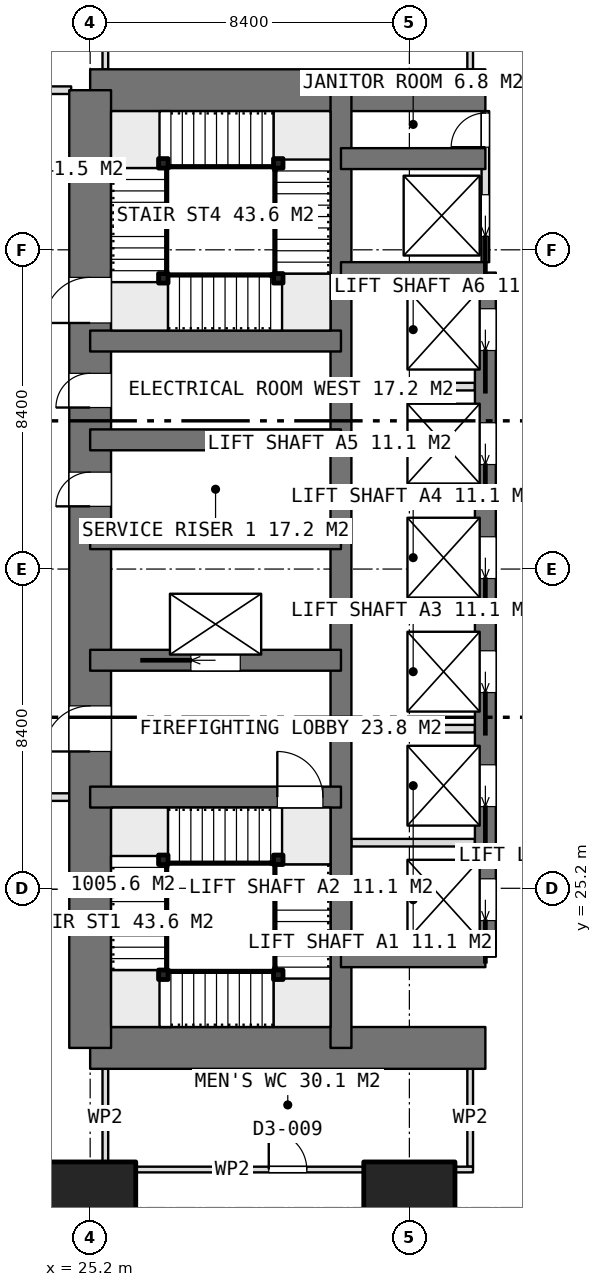
"""IFC4 building model, lengths in metres.
Left out: names, types, materials, properties, quantities, classifications, styles, units other than length and angle.
Written with IfcOpenShell. Run it as: python <this file> out.ifc"""

import sys

from ifc_helpers import new_model, si_unit, direction, frame, frame_2d, origin, origin_2d, place, context, subcontext, project, spatial, rectangle, extrude, element, fill, save


model = new_model("IFC4")
c1 = context("Model", 3, precision=1e-05, world=origin(), true_north=direction((0.0, 1.0)))
c2 = subcontext(c1, "Body", "Model", "MODEL_VIEW")
j1 = project(units=[si_unit("LENGTHUNIT", "METRE"), si_unit("PLANEANGLEUNIT", "RADIAN")], contexts=[c1])
p1 = place(None, origin())
s1 = spatial("IfcSite", under=j1, at=p1, CompositionType="ELEMENT")
p2 = place(p1, origin())
s2 = spatial("IfcBuilding", under=s1, at=p2, CompositionType="ELEMENT")
p3 = place(p2, origin())
s3 = spatial("IfcBuildingStorey", under=s2, at=p3, CompositionType="ELEMENT", Elevation=0.0)
for number, where, z_axis, x_axis in (
    (1, (25.2, 21.0, 0.0), (0.0, 0.0, 1.0), (1.0, 0.0, 0.0)),
    (2, (25.2, 46.2, 0.0), (0.0, 0.0, 1.0), (1.0, 0.0, 0.0)),
):
    element("IfcWall", number, at=place(p3, frame(where, z_axis=z_axis, x_axis=x_axis)), inside=s3, PredefinedType="SHEAR", context=c2, shape_type="SweptSolid", body=[
        extrude(rectangle(XDim=10.4, YDim=1.1, at=frame_2d((5.2, 0.0))), origin(), (0.0, 0.0, 1.0), 5.4),
    ])
p4 = place(p3, frame((25.2, 21.0, 0.0), z_axis=(0.0, 0.0, 1.0), x_axis=(0.0, 1.0, 0.0)))
e3 = element("IfcWall", 3, at=p4, inside=s3, PredefinedType="SHEAR", context=c2, shape_type="SweptSolid", body=[
    extrude(rectangle(XDim=25.2, YDim=1.1, at=frame_2d((12.6, 0.0))), origin(), (0.0, 0.0, 1.0), 5.4),
])
p5 = place(p4, frame((7.8, 0.0, 0.0)))
e4 = element("IfcOpeningElement", 4, at=p5, cuts=e3, PredefinedType="OPENING", context=c2, shape_type="SweptSolid", body=[
    extrude(rectangle(XDim=1.2, YDim=2.1, at=frame_2d((0.6, 1.05))), frame((0.0, 0.56, 0.0), z_axis=(0.0, -1.0, 0.0), x_axis=(1.0, 0.0, 0.0)), (0.0, 0.0, 1.0), 1.12),
])
p6 = place(p4, frame((14.25, 0.0, 0.0)))
e5 = element("IfcOpeningElement", 5, at=p6, cuts=e3, PredefinedType="OPENING", context=c2, shape_type="SweptSolid", body=[
    extrude(rectangle(XDim=0.9, YDim=2.1, at=frame_2d((0.45, 1.05))), frame((0.0, 0.56, 0.0), z_axis=(0.0, -1.0, 0.0), x_axis=(1.0, 0.0, 0.0)), (0.0, 0.0, 1.0), 1.12),
])
p7 = place(p4, frame((16.85, 0.0, 0.0)))
e6 = element("IfcOpeningElement", 6, at=p7, cuts=e3, PredefinedType="OPENING", context=c2, shape_type="SweptSolid", body=[
    extrude(rectangle(XDim=0.9, YDim=2.1, at=frame_2d((0.45, 1.05))), frame((0.0, 0.56, 0.0), z_axis=(0.0, -1.0, 0.0), x_axis=(1.0, 0.0, 0.0)), (0.0, 0.0, 1.0), 1.12),
])
p8 = place(p4, frame((19.075, 0.0, 0.0)))
e7 = element("IfcOpeningElement", 7, at=p8, cuts=e3, PredefinedType="OPENING", context=c2, shape_type="SweptSolid", body=[
    extrude(rectangle(XDim=1.2, YDim=2.1, at=frame_2d((0.6, 1.05))), frame((0.0, 0.56, 0.0), z_axis=(0.0, -1.0, 0.0), x_axis=(1.0, 0.0, 0.0)), (0.0, 0.0, 1.0), 1.12),
])
p9 = place(p3, frame((31.8, 21.0, 0.0), z_axis=(0.0, 0.0, 1.0), x_axis=(0.0, 1.0, 0.0)))
e8 = element("IfcWall", 8, at=p9, inside=s3, PredefinedType="SHEAR", context=c2, shape_type="SweptSolid", body=[
    extrude(rectangle(XDim=25.2, YDim=0.55, at=frame_2d((12.6, 0.0))), origin(), (0.0, 0.0, 1.0), 5.4),
])
p10 = place(p3, frame((35.6, 23.4, 0.0), z_axis=(0.0, 0.0, 1.0), x_axis=(0.0, 1.0, 0.0)))
e9 = element("IfcWall", 9, at=p10, inside=s3, PredefinedType="SHEAR", context=c2, shape_type="SweptSolid", body=[
    extrude(rectangle(XDim=18.0, YDim=0.55, at=frame_2d((9.0, 0.0))), origin(), (0.0, 0.0, 1.0), 5.4),
])
p11 = place(p10, frame((0.95, 0.0, 0.0)))
e10 = element("IfcOpeningElement", 10, at=p11, cuts=e9, PredefinedType="OPENING", context=c2, shape_type="SweptSolid", body=[
    extrude(rectangle(XDim=1.1, YDim=2.1, at=frame_2d((0.55, 1.05))), frame((0.0, 0.285, 0.0), z_axis=(0.0, -1.0, 0.0), x_axis=(1.0, 0.0, 0.0)), (0.0, 0.0, 1.0), 0.57),
])
p12 = place(p10, frame((3.95, 0.0, 0.0)))
e11 = element("IfcOpeningElement", 11, at=p12, cuts=e9, PredefinedType="OPENING", context=c2, shape_type="SweptSolid", body=[
    extrude(rectangle(XDim=1.1, YDim=2.1, at=frame_2d((0.55, 1.05))), frame((0.0, 0.285, 0.0), z_axis=(0.0, -1.0, 0.0), x_axis=(1.0, 0.0, 0.0)), (0.0, 0.0, 1.0), 0.57),
])
p13 = place(p10, frame((6.95, 0.0, 0.0)))
e12 = element("IfcOpeningElement", 12, at=p13, cuts=e9, PredefinedType="OPENING", context=c2, shape_type="SweptSolid", body=[
    extrude(rectangle(XDim=1.1, YDim=2.1, at=frame_2d((0.55, 1.05))), frame((0.0, 0.285, 0.0), z_axis=(0.0, -1.0, 0.0), x_axis=(1.0, 0.0, 0.0)), (0.0, 0.0, 1.0), 0.57),
])
p14 = place(p10, frame((9.95, 0.0, 0.0)))
e13 = element("IfcOpeningElement", 13, at=p14, cuts=e9, PredefinedType="OPENING", context=c2, shape_type="SweptSolid", body=[
    extrude(rectangle(XDim=1.1, YDim=2.1, at=frame_2d((0.55, 1.05))), frame((0.0, 0.285, 0.0), z_axis=(0.0, -1.0, 0.0), x_axis=(1.0, 0.0, 0.0)), (0.0, 0.0, 1.0), 0.57),
])
p15 = place(p10, frame((12.95, 0.0, 0.0)))
e14 = element("IfcOpeningElement", 14, at=p15, cuts=e9, PredefinedType="OPENING", context=c2, shape_type="SweptSolid", body=[
    extrude(rectangle(XDim=1.1, YDim=2.1, at=frame_2d((0.55, 1.05))), frame((0.0, 0.285, 0.0), z_axis=(0.0, -1.0, 0.0), x_axis=(1.0, 0.0, 0.0)), (0.0, 0.0, 1.0), 0.57),
])
p16 = place(p10, frame((15.95, 0.0, 0.0)))
e15 = element("IfcOpeningElement", 15, at=p16, cuts=e9, PredefinedType="OPENING", context=c2, shape_type="SweptSolid", body=[
    extrude(rectangle(XDim=1.1, YDim=2.1, at=frame_2d((0.55, 1.05))), frame((0.0, 0.285, 0.0), z_axis=(0.0, -1.0, 0.0), x_axis=(1.0, 0.0, 0.0)), (0.0, 0.0, 1.0), 0.57),
])
for number, where, z_axis, x_axis in (
    (16, (31.8, 23.4, 0.0), (0.0, 0.0, 1.0), (1.0, 0.0, 0.0)),
    (17, (31.8, 41.4, 0.0), (0.0, 0.0, 1.0), (1.0, 0.0, 0.0)),
    (18, (31.8, 44.4, 0.0), (0.0, 0.0, 1.0), (1.0, 0.0, 0.0)),
):
    element("IfcWall", number, at=place(p3, frame(where, z_axis=z_axis, x_axis=x_axis)), inside=s3, PredefinedType="SHEAR", context=c2, shape_type="SweptSolid", body=[
        extrude(rectangle(XDim=3.8, YDim=0.55, at=frame_2d((1.9, 0.0))), origin(), (0.0, 0.0, 1.0), 5.4),
    ])
p17 = place(p3, frame((25.2, 27.6, 0.0), z_axis=(0.0, 0.0, 1.0), x_axis=(1.0, 0.0, 0.0)))
e19 = element("IfcWall", 19, at=p17, inside=s3, PredefinedType="SHEAR", context=c2, shape_type="SweptSolid", body=[
    extrude(rectangle(XDim=6.6, YDim=0.55, at=frame_2d((3.3, 0.0))), origin(), (0.0, 0.0, 1.0), 5.4),
])
p18 = place(p17, frame((4.925, 0.0, 0.0)))
e20 = element("IfcOpeningElement", 20, at=p18, cuts=e19, PredefinedType="OPENING", context=c2, shape_type="SweptSolid", body=[
    extrude(rectangle(XDim=1.2, YDim=2.1, at=frame_2d((0.6, 1.05))), frame((0.0, 0.285, 0.0), z_axis=(0.0, -1.0, 0.0), x_axis=(1.0, 0.0, 0.0)), (0.0, 0.0, 1.0), 0.57),
])
p19 = place(p3, frame((25.2, 31.2, 0.0), z_axis=(0.0, 0.0, 1.0), x_axis=(1.0, 0.0, 0.0)))
e21 = element("IfcWall", 21, at=p19, inside=s3, PredefinedType="SHEAR", context=c2, shape_type="SweptSolid", body=[
    extrude(rectangle(XDim=6.6, YDim=0.55, at=frame_2d((3.3, 0.0))), origin(), (0.0, 0.0, 1.0), 5.4),
])
p20 = place(p19, frame((2.65, 0.0, 0.0)))
e22 = element("IfcOpeningElement", 22, at=p20, cuts=e21, PredefinedType="OPENING", context=c2, shape_type="SweptSolid", body=[
    extrude(rectangle(XDim=1.3, YDim=2.1, at=frame_2d((0.65, 1.05))), frame((0.0, 0.285, 0.0), z_axis=(0.0, -1.0, 0.0), x_axis=(1.0, 0.0, 0.0)), (0.0, 0.0, 1.0), 0.57),
])
for number, where, z_axis, x_axis in (
    (23, (25.2, 34.4, 0.0), (0.0, 0.0, 1.0), (1.0, 0.0, 0.0)),
    (24, (25.2, 37.0, 0.0), (0.0, 0.0, 1.0), (1.0, 0.0, 0.0)),
    (25, (25.2, 39.6, 0.0), (0.0, 0.0, 1.0), (1.0, 0.0, 0.0)),
):
    element("IfcWall", number, at=place(p3, frame(where, z_axis=z_axis, x_axis=x_axis)), inside=s3, PredefinedType="SHEAR", context=c2, shape_type="SweptSolid", body=[
        extrude(rectangle(XDim=6.6, YDim=0.55, at=frame_2d((3.3, 0.0))), origin(), (0.0, 0.0, 1.0), 5.4),
    ])
for number, where, z_axis, x_axis in (
    (26, (25.2, 16.8, 0.0), (0.0, 0.0, 1.0), (1.0, 0.0, 0.0)),
    (27, (33.6, 16.8, 0.0), (0.0, 0.0, 1.0), (1.0, 0.0, 0.0)),
):
    element("IfcColumn", number, at=place(p3, frame(where, z_axis=z_axis, x_axis=x_axis)), inside=s3, PredefinedType="COLUMN", context=c2, shape_type="SweptSolid", body=[
        extrude(rectangle(XDim=2.4, YDim=2.4, at=origin_2d()), origin(), (0.0, 0.0, 1.0), 5.4),
    ])
for number, where, z_axis, x_axis in (
    (28, (32.075, 26.4, 0.0), (0.0, 0.0, 1.0), (1.0, 0.0, 0.0)),
    (29, (32.075, 29.4, 0.0), (0.0, 0.0, 1.0), (1.0, 0.0, 0.0)),
    (30, (32.075, 32.4, 0.0), (0.0, 0.0, 1.0), (1.0, 0.0, 0.0)),
    (31, (32.075, 35.4, 0.0), (0.0, 0.0, 1.0), (1.0, 0.0, 0.0)),
    (32, (32.075, 38.4, 0.0), (0.0, 0.0, 1.0), (1.0, 0.0, 0.0)),
):
    element("IfcWall", number, at=place(p3, frame(where, z_axis=z_axis, x_axis=x_axis)), inside=s3, PredefinedType="PARTITIONING", context=c2, shape_type="SweptSolid", body=[
        extrude(rectangle(XDim=3.25, YDim=0.2, at=frame_2d((1.625, 0.0))), origin(), (0.0, 0.0, 1.0), 5.1),
    ])
p21 = place(p3, frame((35.6, 41.675, 0.0), z_axis=(0.0, 0.0, 1.0), x_axis=(0.0, 1.0, 0.0)))
e33 = element("IfcWall", 33, at=p21, inside=s3, PredefinedType="PARTITIONING", context=c2, shape_type="SweptSolid", body=[
    extrude(rectangle(XDim=3.975, YDim=0.2, at=frame_2d((1.987, 0.0))), origin(), (0.0, 0.0, 1.0), 5.1),
])
p22 = place(p21, frame((3.025, 0.0, 0.0)))
e34 = element("IfcOpeningElement", 34, at=p22, cuts=e33, PredefinedType="OPENING", context=c2, shape_type="SweptSolid", body=[
    extrude(rectangle(XDim=0.9, YDim=2.1, at=frame_2d((0.45, 1.05))), frame((0.0, 0.11, 0.0), z_axis=(0.0, -1.0, 0.0), x_axis=(1.0, 0.0, 0.0)), (0.0, 0.0, 1.0), 0.22),
])
p23 = place(p21, frame((0.675, 0.0, 0.0)))
e35 = element("IfcOpeningElement", 35, at=p23, cuts=e33, PredefinedType="OPENING", context=c2, shape_type="SweptSolid", body=[
    extrude(rectangle(XDim=1.1, YDim=2.1, at=frame_2d((0.55, 1.05))), frame((0.0, 0.11, 0.0), z_axis=(0.0, -1.0, 0.0), x_axis=(1.0, 0.0, 0.0)), (0.0, 0.0, 1.0), 0.22),
])
for number, where, z_axis, x_axis in (
    (36, (25.6, 46.75, 0.0), (0.0, 0.0, 1.0), (0.0, 1.0, 0.0)),
    (37, (35.2, 46.75, 0.0), (0.0, 0.0, 1.0), (0.0, 1.0, 0.0)),
):
    element("IfcWall", number, at=place(p3, frame(where, z_axis=z_axis, x_axis=x_axis)), inside=s3, PredefinedType="PARTITIONING", context=c2, shape_type="SweptSolid", body=[
        extrude(rectangle(XDim=2.575, YDim=0.15, at=frame_2d((1.288, 0.0))), origin(), (0.0, 0.0, 1.0), 5.1),
    ])
p24 = place(p3, frame((25.525, 17.8, 0.0), z_axis=(0.0, 0.0, 1.0), x_axis=(1.0, 0.0, 0.0)))
e38 = element("IfcWall", 38, at=p24, inside=s3, PredefinedType="PARTITIONING", context=c2, shape_type="SweptSolid", body=[
    extrude(rectangle(XDim=9.75, YDim=0.15, at=frame_2d((4.875, 0.0))), origin(), (0.0, 0.0, 1.0), 5.1),
])
p25 = place(p24, frame((4.375, 0.0, 0.0)))
e39 = element("IfcOpeningElement", 39, at=p25, cuts=e38, PredefinedType="OPENING", context=c2, shape_type="SweptSolid", body=[
    extrude(rectangle(XDim=1.0, YDim=2.1, at=frame_2d((0.5, 1.05))), frame((0.0, 0.085, 0.0), z_axis=(0.0, -1.0, 0.0), x_axis=(1.0, 0.0, 0.0)), (0.0, 0.0, 1.0), 0.17),
])
for number, where, z_axis, x_axis in (
    (40, (25.6, 17.875, 0.0), (0.0, 0.0, 1.0), (0.0, 1.0, 0.0)),
    (41, (35.2, 17.875, 0.0), (0.0, 0.0, 1.0), (0.0, 1.0, 0.0)),
):
    element("IfcWall", number, at=place(p3, frame(where, z_axis=z_axis, x_axis=x_axis)), inside=s3, PredefinedType="PARTITIONING", context=c2, shape_type="SweptSolid", body=[
        extrude(rectangle(XDim=2.575, YDim=0.15, at=frame_2d((1.288, 0.0))), origin(), (0.0, 0.0, 1.0), 5.1),
    ])
p26 = place(p3, frame((23.6, 46.2, 0.0), z_axis=(0.0, 0.0, 1.0), x_axis=(1.0, 0.0, 0.0)))
e42 = element("IfcWall", 42, at=p26, inside=s3, PredefinedType="PARTITIONING", context=c2, shape_type="SweptSolid", body=[
    extrude(rectangle(XDim=1.1, YDim=0.2, at=frame_2d((0.55, 0.0))), origin(), (0.0, 0.0, 1.0), 5.1),
])
p27 = place(p3, frame((24.65, 27.6, 0.0), z_axis=(0.0, 0.0, 1.0), x_axis=(-1.0, 0.0, 0.0)))
e43 = element("IfcWall", 43, at=p27, inside=s3, PredefinedType="PARTITIONING", context=c2, shape_type="SweptSolid", body=[
    extrude(rectangle(XDim=3.25, YDim=0.2, at=frame_2d((1.625, 0.0))), origin(), (0.0, 0.0, 1.0), 5.1),
])
for number, where, z_axis, x_axis in (
    (44, (30.15, 25.95, 0.0), (0.0, 0.0, 1.0), (1.0, 0.0, 0.0)),
    (45, (30.15, 22.925, 0.0), (0.0, 0.0, 1.0), (1.0, 0.0, 0.0)),
    (46, (27.125, 22.925, 0.0), (0.0, 0.0, 1.0), (1.0, 0.0, 0.0)),
    (47, (27.125, 25.95, 0.0), (0.0, 0.0, 1.0), (1.0, 0.0, 0.0)),
    (48, (27.125, 41.25, 0.0), (0.0, 0.0, 1.0), (1.0, 0.0, 0.0)),
    (49, (30.15, 41.25, 0.0), (0.0, 0.0, 1.0), (1.0, 0.0, 0.0)),
    (50, (30.15, 44.275, 0.0), (0.0, 0.0, 1.0), (1.0, 0.0, 0.0)),
    (51, (27.125, 44.275, 0.0), (0.0, 0.0, 1.0), (1.0, 0.0, 0.0)),
):
    element("IfcColumn", number, at=place(p3, frame(where, z_axis=z_axis, x_axis=x_axis)), inside=s3, PredefinedType="COLUMN", context=c2, shape_type="SweptSolid", body=[
        extrude(rectangle(XDim=0.25, YDim=0.25, at=origin_2d()), origin(), (0.0, 0.0, 1.0), 5.4),
    ])
p28 = place(p5, origin())
e52 = element("IfcDoor", 52, at=p28, inside=s3, OperationType="SINGLE_SWING_LEFT", PredefinedType="DOOR", context=c2, shape_type="SweptSolid", body=[
    extrude(rectangle(XDim=1.2, YDim=2.1, at=frame_2d((0.6, 1.05))), frame((0.0, 0.025, 0.0), z_axis=(0.0, -1.0, 0.0), x_axis=(1.0, 0.0, 0.0)), (0.0, 0.0, 1.0), 0.05),
])
fill(e4, e52)
p29 = place(p6, origin())
e53 = element("IfcDoor", 53, at=p29, inside=s3, OperationType="SINGLE_SWING_LEFT", PredefinedType="DOOR", context=c2, shape_type="SweptSolid", body=[
    extrude(rectangle(XDim=0.9, YDim=2.1, at=frame_2d((0.45, 1.05))), frame((0.0, 0.025, 0.0), z_axis=(0.0, -1.0, 0.0), x_axis=(1.0, 0.0, 0.0)), (0.0, 0.0, 1.0), 0.05),
])
fill(e5, e53)
p30 = place(p7, origin())
e54 = element("IfcDoor", 54, at=p30, inside=s3, OperationType="SINGLE_SWING_LEFT", PredefinedType="DOOR", context=c2, shape_type="SweptSolid", body=[
    extrude(rectangle(XDim=0.9, YDim=2.1, at=frame_2d((0.45, 1.05))), frame((0.0, 0.025, 0.0), z_axis=(0.0, -1.0, 0.0), x_axis=(1.0, 0.0, 0.0)), (0.0, 0.0, 1.0), 0.05),
])
fill(e6, e54)
p31 = place(p22, origin())
e55 = element("IfcDoor", 55, at=p31, inside=s3, OperationType="SINGLE_SWING_LEFT", PredefinedType="DOOR", context=c2, shape_type="SweptSolid", body=[
    extrude(rectangle(XDim=0.9, YDim=2.1, at=frame_2d((0.45, 1.05))), frame((0.0, 0.025, 0.0), z_axis=(0.0, -1.0, 0.0), x_axis=(1.0, 0.0, 0.0)), (0.0, 0.0, 1.0), 0.05),
])
fill(e34, e55)
p32 = place(p11, origin())
e56 = element("IfcDoor", 56, at=p32, inside=s3, OperationType="SLIDING_TO_LEFT", PredefinedType="USERDEFINED", context=c2, shape_type="SweptSolid", body=[
    extrude(rectangle(XDim=1.1, YDim=2.1, at=frame_2d((0.55, 1.05))), frame((0.0, 0.025, 0.0), z_axis=(0.0, -1.0, 0.0), x_axis=(1.0, 0.0, 0.0)), (0.0, 0.0, 1.0), 0.05),
])
fill(e10, e56)
p33 = place(p12, origin())
e57 = element("IfcDoor", 57, at=p33, inside=s3, OperationType="SLIDING_TO_LEFT", PredefinedType="USERDEFINED", context=c2, shape_type="SweptSolid", body=[
    extrude(rectangle(XDim=1.1, YDim=2.1, at=frame_2d((0.55, 1.05))), frame((0.0, 0.025, 0.0), z_axis=(0.0, -1.0, 0.0), x_axis=(1.0, 0.0, 0.0)), (0.0, 0.0, 1.0), 0.05),
])
fill(e11, e57)
p34 = place(p13, origin())
e58 = element("IfcDoor", 58, at=p34, inside=s3, OperationType="SLIDING_TO_LEFT", PredefinedType="USERDEFINED", context=c2, shape_type="SweptSolid", body=[
    extrude(rectangle(XDim=1.1, YDim=2.1, at=frame_2d((0.55, 1.05))), frame((0.0, 0.025, 0.0), z_axis=(0.0, -1.0, 0.0), x_axis=(1.0, 0.0, 0.0)), (0.0, 0.0, 1.0), 0.05),
])
fill(e12, e58)
p35 = place(p14, origin())
e59 = element("IfcDoor", 59, at=p35, inside=s3, OperationType="SLIDING_TO_LEFT", PredefinedType="USERDEFINED", context=c2, shape_type="SweptSolid", body=[
    extrude(rectangle(XDim=1.1, YDim=2.1, at=frame_2d((0.55, 1.05))), frame((0.0, 0.025, 0.0), z_axis=(0.0, -1.0, 0.0), x_axis=(1.0, 0.0, 0.0)), (0.0, 0.0, 1.0), 0.05),
])
fill(e13, e59)
p36 = place(p15, origin())
e60 = element("IfcDoor", 60, at=p36, inside=s3, OperationType="SLIDING_TO_LEFT", PredefinedType="USERDEFINED", context=c2, shape_type="SweptSolid", body=[
    extrude(rectangle(XDim=1.1, YDim=2.1, at=frame_2d((0.55, 1.05))), frame((0.0, 0.025, 0.0), z_axis=(0.0, -1.0, 0.0), x_axis=(1.0, 0.0, 0.0)), (0.0, 0.0, 1.0), 0.05),
])
fill(e14, e60)
p37 = place(p16, origin())
e61 = element("IfcDoor", 61, at=p37, inside=s3, OperationType="SLIDING_TO_LEFT", PredefinedType="USERDEFINED", context=c2, shape_type="SweptSolid", body=[
    extrude(rectangle(XDim=1.1, YDim=2.1, at=frame_2d((0.55, 1.05))), frame((0.0, 0.025, 0.0), z_axis=(0.0, -1.0, 0.0), x_axis=(1.0, 0.0, 0.0)), (0.0, 0.0, 1.0), 0.05),
])
fill(e15, e61)
p38 = place(p20, origin())
e62 = element("IfcDoor", 62, at=p38, inside=s3, OperationType="SLIDING_TO_LEFT", PredefinedType="USERDEFINED", context=c2, shape_type="SweptSolid", body=[
    extrude(rectangle(XDim=1.3, YDim=2.1, at=frame_2d((0.65, 1.05))), frame((0.0, 0.025, 0.0), z_axis=(0.0, -1.0, 0.0), x_axis=(1.0, 0.0, 0.0)), (0.0, 0.0, 1.0), 0.05),
])
fill(e22, e62)
p39 = place(p23, origin())
e63 = element("IfcDoor", 63, at=p39, inside=s3, OperationType="SLIDING_TO_LEFT", PredefinedType="USERDEFINED", context=c2, shape_type="SweptSolid", body=[
    extrude(rectangle(XDim=1.1, YDim=2.1, at=frame_2d((0.55, 1.05))), frame((0.0, 0.025, 0.0), z_axis=(0.0, -1.0, 0.0), x_axis=(1.0, 0.0, 0.0)), (0.0, 0.0, 1.0), 0.05),
])
fill(e35, e63)
p40 = place(p25, origin())
e64 = element("IfcDoor", 64, at=p40, inside=s3, OperationType="SINGLE_SWING_LEFT", PredefinedType="DOOR", context=c2, shape_type="SweptSolid", body=[
    extrude(rectangle(XDim=1.0, YDim=2.1, at=frame_2d((0.5, 1.05))), frame((0.0, 0.025, 0.0), z_axis=(0.0, -1.0, 0.0), x_axis=(1.0, 0.0, 0.0)), (0.0, 0.0, 1.0), 0.05),
])
fill(e39, e64)
p41 = place(p18, origin())
e65 = element("IfcDoor", 65, at=p41, inside=s3, OperationType="SINGLE_SWING_RIGHT", PredefinedType="DOOR", context=c2, shape_type="SweptSolid", body=[
    extrude(rectangle(XDim=1.2, YDim=2.1, at=frame_2d((0.6, 1.05))), frame((0.0, 0.025, 0.0), z_axis=(0.0, -1.0, 0.0), x_axis=(1.0, 0.0, 0.0)), (0.0, 0.0, 1.0), 0.05),
])
fill(e20, e65)
p42 = place(p8, origin())
e66 = element("IfcDoor", 66, at=p42, inside=s3, OperationType="SINGLE_SWING_RIGHT", PredefinedType="DOOR", context=c2, shape_type="SweptSolid", body=[
    extrude(rectangle(XDim=1.2, YDim=2.1, at=frame_2d((0.6, 1.05))), frame((0.0, 0.025, 0.0), z_axis=(0.0, -1.0, 0.0), x_axis=(1.0, 0.0, 0.0)), (0.0, 0.0, 1.0), 0.05),
])
fill(e7, e66)
save(model, sys.argv[1])
